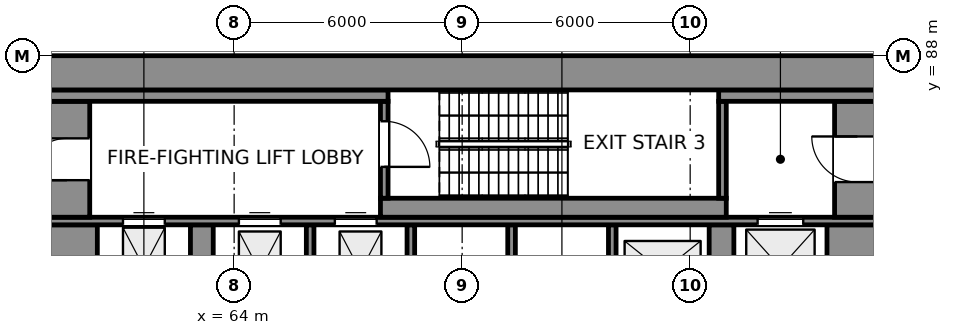
"""IFC4 building model, lengths in metres.
Left out: names, types, materials, properties, quantities, classifications, styles, units other than length and angle.
Written with IfcOpenShell. Run it as: python <this file> out.ifc"""

import sys

from ifc_helpers import new_model, si_unit, direction, frame, frame_2d, origin, place, context, subcontext, project, spatial, rectangle, extrude, element, fill, save


model = new_model("IFC4")
c1 = context("Model", 3, precision=1e-05, world=origin(), true_north=direction((0.0, 1.0)))
c2 = subcontext(c1, "Body", "Model", "MODEL_VIEW")
j1 = project(units=[si_unit("LENGTHUNIT", "METRE"), si_unit("PLANEANGLEUNIT", "RADIAN")], contexts=[c1])
p1 = place(None, origin())
s1 = spatial("IfcSite", under=j1, at=p1, CompositionType="ELEMENT")
p2 = place(p1, origin())
s2 = spatial("IfcBuilding", under=s1, at=p2, CompositionType="ELEMENT")
p3 = place(p2, frame((0.0, 0.0, 29.0)))
s3 = spatial("IfcBuildingStorey", under=s2, at=p3, CompositionType="ELEMENT", Elevation=29.0)
for number, where, z_axis, x_axis in (
    (1, (66.0, 81.1, 0.0), (0.0, 0.0, 1.0), (0.0, 1.0, 0.0)),
    (2, (68.65, 81.1, 0.0), (0.0, 0.0, 1.0), (0.0, 1.0, 0.0)),
    (3, (71.3, 81.1, 0.0), (0.0, 0.0, 1.0), (0.0, 1.0, 0.0)),
    (4, (73.95, 81.1, 0.0), (0.0, 0.0, 1.0), (0.0, 1.0, 0.0)),
):
    element("IfcWall", number, at=place(p3, frame(where, z_axis=z_axis, x_axis=x_axis)), inside=s3, PredefinedType="SHEAR", context=c2, shape_type="SweptSolid", body=[
        extrude(rectangle(XDim=2.45, YDim=0.2, at=frame_2d((1.225, 0.0))), origin(), (0.0, 0.0, 1.0), 5.0),
    ])
p4 = place(p3, frame((59.7, 81.3, 0.0), z_axis=(0.0, 0.0, 1.0), x_axis=(0.0, 1.0, 0.0)))
e5 = element("IfcWall", 5, at=p4, inside=s3, PredefinedType="SHEAR", context=c2, shape_type="SweptSolid", body=[
    extrude(rectangle(XDim=2.25, YDim=1.4, at=frame_2d((1.125, 0.0))), origin(), (0.0, 0.0, 1.0), 5.0),
])
p5 = place(p3, frame((63.15, 81.3, 0.0), z_axis=(0.0, 0.0, 1.0), x_axis=(0.0, 1.0, 0.0)))
e6 = element("IfcWall", 6, at=p5, inside=s3, PredefinedType="SHEAR", context=c2, shape_type="SweptSolid", body=[
    extrude(rectangle(XDim=2.25, YDim=0.6, at=frame_2d((1.125, 0.0))), origin(), (0.0, 0.0, 1.0), 5.0),
])
p6 = place(p3, frame((76.825, 81.3, 0.0), z_axis=(0.0, 0.0, 1.0), x_axis=(0.0, 1.0, 0.0)))
e7 = element("IfcWall", 7, at=p6, inside=s3, PredefinedType="SHEAR", context=c2, shape_type="SweptSolid", body=[
    extrude(rectangle(XDim=2.25, YDim=0.65, at=frame_2d((1.125, 0.0))), origin(), (0.0, 0.0, 1.0), 5.0),
])
p7 = place(p3, frame((80.3, 81.3, 0.0), z_axis=(0.0, 0.0, 1.0), x_axis=(0.0, 1.0, 0.0)))
e8 = element("IfcWall", 8, at=p7, inside=s3, PredefinedType="SHEAR", context=c2, shape_type="SweptSolid", body=[
    extrude(rectangle(XDim=2.25, YDim=1.4, at=frame_2d((1.125, 0.0))), origin(), (0.0, 0.0, 1.0), 5.0),
])
p8 = place(p3, frame((59.0, 83.65, 0.0), z_axis=(0.0, 0.0, 1.0), x_axis=(1.0, 0.0, 0.0)))
e9 = element("IfcWall", 9, at=p8, inside=s3, PredefinedType="SHEAR", context=c2, shape_type="SweptSolid", body=[
    extrude(rectangle(XDim=22.0, YDim=0.2, at=frame_2d((11.0, 0.0))), origin(), (0.0, 0.0, 1.0), 5.0),
])
p9 = place(p8, frame((5.125, 0.0, 0.0)))
e10 = element("IfcOpeningElement", 10, at=p9, cuts=e9, PredefinedType="OPENING", context=c2, shape_type="SweptSolid", body=[
    extrude(rectangle(XDim=1.1, YDim=2.1, at=frame_2d((0.55, 1.05))), frame((0.0, 0.11, 0.0), z_axis=(0.0, -1.0, 0.0), x_axis=(1.0, 0.0, 0.0)), (0.0, 0.0, 1.0), 0.22),
])
p10 = place(p8, frame((7.65, 0.0, 0.0)))
e11 = element("IfcOpeningElement", 11, at=p10, cuts=e9, PredefinedType="OPENING", context=c2, shape_type="SweptSolid", body=[
    extrude(rectangle(XDim=1.1, YDim=2.1, at=frame_2d((0.55, 1.05))), frame((0.0, 0.11, 0.0), z_axis=(0.0, -1.0, 0.0), x_axis=(1.0, 0.0, 0.0)), (0.0, 0.0, 1.0), 0.22),
])
p11 = place(p8, frame((18.775, 0.0, 0.0)))
e12 = element("IfcOpeningElement", 12, at=p11, cuts=e9, PredefinedType="OPENING", context=c2, shape_type="SweptSolid", body=[
    extrude(rectangle(XDim=1.2, YDim=2.1, at=frame_2d((0.6, 1.05))), frame((0.0, 0.11, 0.0), z_axis=(0.0, -1.0, 0.0), x_axis=(1.0, 0.0, 0.0)), (0.0, 0.0, 1.0), 0.22),
])
p12 = place(p8, frame((2.075, 0.0, 0.0)))
e13 = element("IfcOpeningElement", 13, at=p12, cuts=e9, PredefinedType="OPENING", context=c2, shape_type="SweptSolid", body=[
    extrude(rectangle(XDim=1.1, YDim=2.1, at=frame_2d((0.55, 1.05))), frame((0.0, 0.11, 0.0), z_axis=(0.0, -1.0, 0.0), x_axis=(1.0, 0.0, 0.0)), (0.0, 0.0, 1.0), 0.22),
])
p13 = place(p3, frame((59.6, 83.75, 0.0), z_axis=(0.0, 0.0, 1.0), x_axis=(0.0, 1.0, 0.0)))
e14 = element("IfcWall", 14, at=p13, inside=s3, PredefinedType="SHEAR", context=c2, shape_type="SweptSolid", body=[
    extrude(rectangle(XDim=3.05, YDim=1.2, at=frame_2d((1.525, 0.0))), origin(), (0.0, 0.0, 1.0), 5.0),
])
p14 = place(p13, frame((0.975, 0.0, 0.0)))
e15 = element("IfcOpeningElement", 15, at=p14, cuts=e14, PredefinedType="OPENING", context=c2, shape_type="SweptSolid", body=[
    extrude(rectangle(XDim=1.1, YDim=2.1, at=frame_2d((0.55, 1.05))), frame((0.0, 0.61, 0.0), z_axis=(0.0, -1.0, 0.0), x_axis=(1.0, 0.0, 0.0)), (0.0, 0.0, 1.0), 1.22),
])
p15 = place(p3, frame((67.85, 84.0, 0.0), z_axis=(0.0, 0.0, 1.0), x_axis=(1.0, 0.0, 0.0)))
e16 = element("IfcWall", 16, at=p15, inside=s3, PredefinedType="SHEAR", context=c2, shape_type="SweptSolid", body=[
    extrude(rectangle(XDim=9.1, YDim=0.5, at=frame_2d((4.55, 0.0))), origin(), (0.0, 0.0, 1.0), 5.0),
])
p16 = place(p3, frame((80.4, 83.75, 0.0), z_axis=(0.0, 0.0, 1.0), x_axis=(0.0, 1.0, 0.0)))
e17 = element("IfcWall", 17, at=p16, inside=s3, PredefinedType="SHEAR", context=c2, shape_type="SweptSolid", body=[
    extrude(rectangle(XDim=3.05, YDim=1.2, at=frame_2d((1.525, 0.0))), origin(), (0.0, 0.0, 1.0), 5.0),
])
p17 = place(p16, frame((0.925, 0.0, 0.0)))
e18 = element("IfcOpeningElement", 18, at=p17, cuts=e17, PredefinedType="OPENING", context=c2, shape_type="SweptSolid", body=[
    extrude(rectangle(XDim=1.2, YDim=2.1, at=frame_2d((0.6, 1.05))), frame((0.0, 0.61, 0.0), z_axis=(0.0, -1.0, 0.0), x_axis=(1.0, 0.0, 0.0)), (0.0, 0.0, 1.0), 1.22),
])
p18 = place(p3, frame((67.95, 84.25, 0.0), z_axis=(0.0, 0.0, 1.0), x_axis=(0.0, 1.0, 0.0)))
e19 = element("IfcWall", 19, at=p18, inside=s3, PredefinedType="SHEAR", context=c2, shape_type="SweptSolid", body=[
    extrude(rectangle(XDim=2.55, YDim=0.2, at=frame_2d((1.275, 0.0))), origin(), (0.0, 0.0, 1.0), 5.0),
])
p19 = place(p18, frame((0.825, 0.0, 0.0)))
e20 = element("IfcOpeningElement", 20, at=p19, cuts=e19, PredefinedType="OPENING", context=c2, shape_type="SweptSolid", body=[
    extrude(rectangle(XDim=1.2, YDim=2.1, at=frame_2d((0.6, 1.05))), frame((0.0, 0.11, 0.0), z_axis=(0.0, -1.0, 0.0), x_axis=(1.0, 0.0, 0.0)), (0.0, 0.0, 1.0), 0.22),
])
p20 = place(p3, frame((76.85, 84.25, 0.0), z_axis=(0.0, 0.0, 1.0), x_axis=(0.0, 1.0, 0.0)))
e21 = element("IfcWall", 21, at=p20, inside=s3, PredefinedType="SHEAR", context=c2, shape_type="SweptSolid", body=[
    extrude(rectangle(XDim=2.55, YDim=0.2, at=frame_2d((1.275, 0.0))), origin(), (0.0, 0.0, 1.0), 5.0),
])
p21 = place(p3, frame((59.0, 86.95, 0.0), z_axis=(0.0, 0.0, 1.0), x_axis=(1.0, 0.0, 0.0)))
e22 = element("IfcWall", 22, at=p21, inside=s3, PredefinedType="SHEAR", context=c2, shape_type="SweptSolid", body=[
    extrude(rectangle(XDim=9.05, YDim=0.3, at=frame_2d((4.525, 0.0))), origin(), (0.0, 0.0, 1.0), 5.0),
])
p22 = place(p3, frame((76.75, 86.95, 0.0), z_axis=(0.0, 0.0, 1.0), x_axis=(1.0, 0.0, 0.0)))
e23 = element("IfcWall", 23, at=p22, inside=s3, PredefinedType="SHEAR", context=c2, shape_type="SweptSolid", body=[
    extrude(rectangle(XDim=4.25, YDim=0.3, at=frame_2d((2.125, 0.0))), origin(), (0.0, 0.0, 1.0), 5.0),
])
p23 = place(p3, frame((59.0, 87.55, 0.0), z_axis=(0.0, 0.0, 1.0), x_axis=(1.0, 0.0, 0.0)))
e24 = element("IfcWall", 24, at=p23, inside=s3, PredefinedType="SHEAR", context=c2, shape_type="SweptSolid", body=[
    extrude(rectangle(XDim=22.0, YDim=0.9, at=frame_2d((11.0, 0.0))), origin(), (0.0, 0.0, 1.0), 5.0),
])
p24 = place(p19, frame((1.2, 0.0, 0.0), z_axis=(0.0, 0.0, 1.0), x_axis=(-1.0, 0.0, 0.0)))
e25 = element("IfcDoor", 25, at=p24, inside=s3, OperationType="SINGLE_SWING_RIGHT", PredefinedType="DOOR", context=c2, shape_type="SweptSolid", body=[
    extrude(rectangle(XDim=1.2, YDim=2.1, at=frame_2d((0.6, 1.05))), frame((0.0, 0.025, 0.0), z_axis=(0.0, -1.0, 0.0), x_axis=(1.0, 0.0, 0.0)), (0.0, 0.0, 1.0), 0.05),
])
fill(e20, e25)
p25 = place(p14, origin())
e26 = element("IfcDoor", 26, at=p25, inside=s3, OperationType="SINGLE_SWING_LEFT", PredefinedType="DOOR", context=c2, shape_type="SweptSolid", body=[
    extrude(rectangle(XDim=1.1, YDim=2.1, at=frame_2d((0.55, 1.05))), frame((0.0, 0.025, 0.0), z_axis=(0.0, -1.0, 0.0), x_axis=(1.0, 0.0, 0.0)), (0.0, 0.0, 1.0), 0.05),
])
fill(e15, e26)
p26 = place(p17, origin())
e27 = element("IfcDoor", 27, at=p26, inside=s3, OperationType="SINGLE_SWING_RIGHT", PredefinedType="DOOR", context=c2, shape_type="SweptSolid", body=[
    extrude(rectangle(XDim=1.2, YDim=2.1, at=frame_2d((0.6, 1.05))), frame((0.0, 0.025, 0.0), z_axis=(0.0, -1.0, 0.0), x_axis=(1.0, 0.0, 0.0)), (0.0, 0.0, 1.0), 0.05),
])
fill(e18, e27)
p27 = place(p9, origin())
e28 = element("IfcDoor", 28, at=p27, inside=s3, OperationType="DOUBLE_DOOR_SLIDING", PredefinedType="DOOR", context=c2, shape_type="SweptSolid", body=[
    extrude(rectangle(XDim=1.1, YDim=2.1, at=frame_2d((0.55, 1.05))), frame((0.0, 0.025, 0.0), z_axis=(0.0, -1.0, 0.0), x_axis=(1.0, 0.0, 0.0)), (0.0, 0.0, 1.0), 0.05),
])
fill(e10, e28)
p28 = place(p10, origin())
e29 = element("IfcDoor", 29, at=p28, inside=s3, OperationType="DOUBLE_DOOR_SLIDING", PredefinedType="DOOR", context=c2, shape_type="SweptSolid", body=[
    extrude(rectangle(XDim=1.1, YDim=2.1, at=frame_2d((0.55, 1.05))), frame((0.0, 0.025, 0.0), z_axis=(0.0, -1.0, 0.0), x_axis=(1.0, 0.0, 0.0)), (0.0, 0.0, 1.0), 0.05),
])
fill(e11, e29)
p29 = place(p11, origin())
e30 = element("IfcDoor", 30, at=p29, inside=s3, OperationType="DOUBLE_DOOR_SLIDING", PredefinedType="DOOR", context=c2, shape_type="SweptSolid", body=[
    extrude(rectangle(XDim=1.2, YDim=2.1, at=frame_2d((0.6, 1.05))), frame((0.0, 0.025, 0.0), z_axis=(0.0, -1.0, 0.0), x_axis=(1.0, 0.0, 0.0)), (0.0, 0.0, 1.0), 0.05),
])
fill(e12, e30)
p30 = place(p12, origin())
e31 = element("IfcDoor", 31, at=p30, inside=s3, OperationType="DOUBLE_DOOR_SLIDING", PredefinedType="DOOR", context=c2, shape_type="SweptSolid", body=[
    extrude(rectangle(XDim=1.1, YDim=2.1, at=frame_2d((0.55, 1.05))), frame((0.0, 0.025, 0.0), z_axis=(0.0, -1.0, 0.0), x_axis=(1.0, 0.0, 0.0)), (0.0, 0.0, 1.0), 0.05),
])
fill(e13, e31)
save(model, sys.argv[1])
